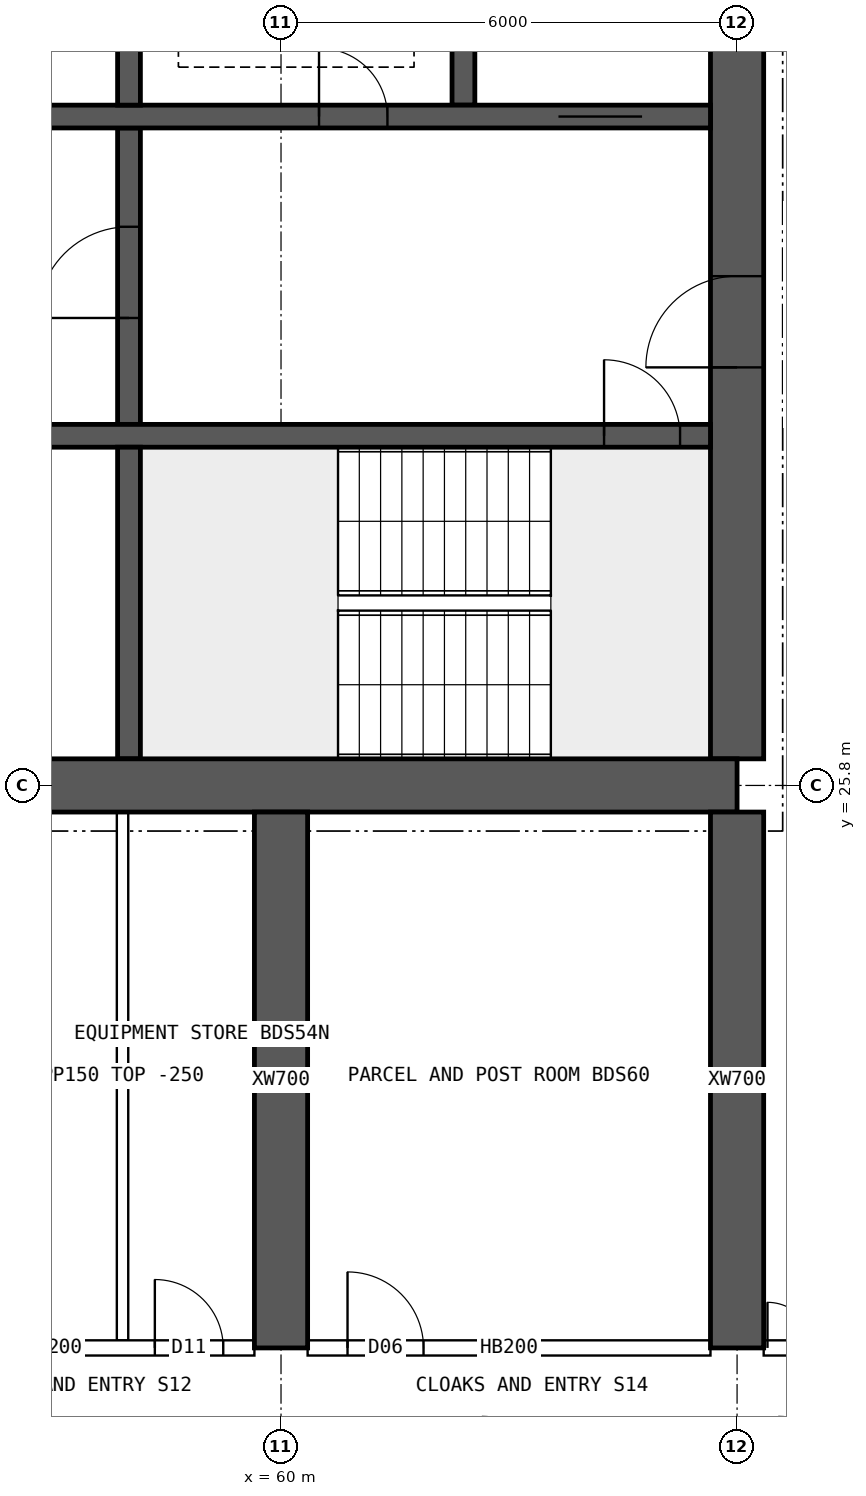
"""IFC4 building model, lengths in metres.
Left out: names, types, materials, properties, quantities, classifications, styles, units other than length and angle.
Written with IfcOpenShell. Run it as: python <this file> out.ifc"""

import sys

from ifc_helpers import new_model, si_unit, direction, frame, frame_2d, origin, place, context, subcontext, project, spatial, rectangle, extrude, element, fill, save


model = new_model("IFC4")
c1 = context("Model", 3, precision=1e-05, world=origin(), true_north=direction((0.0, 1.0)))
c2 = subcontext(c1, "Body", "Model", "MODEL_VIEW")
j1 = project(units=[si_unit("LENGTHUNIT", "METRE"), si_unit("PLANEANGLEUNIT", "RADIAN")], contexts=[c1])
p1 = place(None, origin())
s1 = spatial("IfcSite", under=j1, at=p1, CompositionType="ELEMENT")
p2 = place(p1, origin())
s2 = spatial("IfcBuilding", under=s1, at=p2, CompositionType="ELEMENT")
p3 = place(p2, frame((0.0, 0.0, 250.3)))
s3 = spatial("IfcBuildingStorey", under=s2, at=p3, CompositionType="ELEMENT", Elevation=250.3)
p4 = place(p3, frame((18.0, 25.8, 0.0), z_axis=(0.0, 0.0, 1.0), x_axis=(1.0, 0.0, 0.0)))
e1 = element("IfcWall", 1, at=p4, inside=s3, PredefinedType="SHEAR", context=c2, shape_type="SweptSolid", body=[
    extrude(rectangle(XDim=48.0, YDim=0.7, at=frame_2d((24.0, 0.0))), origin(), (0.0, 0.0, 1.0), 3.75),
])
p5 = place(p3, frame((66.0, 26.15, 0.0), z_axis=(0.0, 0.0, 1.0), x_axis=(0.0, 1.0, 0.0)))
e2 = element("IfcWall", 2, at=p5, inside=s3, PredefinedType="SHEAR", context=c2, shape_type="SweptSolid", body=[
    extrude(rectangle(XDim=11.7, YDim=0.7, at=frame_2d((5.85, 0.0))), origin(), (0.0, 0.0, 1.0), 3.75),
])
p6 = place(p5, frame((5.15, 0.0, 0.0)))
e3 = element("IfcOpeningElement", 3, at=p6, cuts=e2, PredefinedType="OPENING", context=c2, shape_type="SweptSolid", body=[
    extrude(rectangle(XDim=1.2, YDim=2.1, at=frame_2d((0.6, 1.05))), frame((0.0, 0.36, 0.0), z_axis=(0.0, -1.0, 0.0), x_axis=(1.0, 0.0, 0.0)), (0.0, 0.0, 1.0), 0.72),
])
p7 = place(p3, frame((18.35, 30.4, 0.0), z_axis=(0.0, 0.0, 1.0), x_axis=(1.0, 0.0, 0.0)))
e4 = element("IfcWall", 4, at=p7, inside=s3, PredefinedType="SHEAR", context=c2, shape_type="SweptSolid", body=[
    extrude(rectangle(XDim=47.3, YDim=0.3, at=frame_2d((23.65, 0.0))), origin(), (0.0, 0.0, 1.0), 3.75),
])
p8 = place(p7, frame((0.4, 0.0, 0.0)))
e5 = element("IfcOpeningElement", 5, at=p8, cuts=e4, PredefinedType="OPENING", context=c2, shape_type="SweptSolid", body=[
    extrude(rectangle(XDim=1.0, YDim=2.1, at=frame_2d((0.5, 1.05))), frame((0.0, 0.16, 0.0), z_axis=(0.0, -1.0, 0.0), x_axis=(1.0, 0.0, 0.0)), (0.0, 0.0, 1.0), 0.32),
])
p9 = place(p7, frame((45.9, 0.0, 0.0)))
e6 = element("IfcOpeningElement", 6, at=p9, cuts=e4, PredefinedType="OPENING", context=c2, shape_type="SweptSolid", body=[
    extrude(rectangle(XDim=1.0, YDim=2.1, at=frame_2d((0.5, 1.05))), frame((0.0, 0.16, 0.0), z_axis=(0.0, -1.0, 0.0), x_axis=(1.0, 0.0, 0.0)), (0.0, 0.0, 1.0), 0.32),
])
p10 = place(p7, frame((8.4, 0.0, 0.0)))
e7 = element("IfcOpeningElement", 7, at=p10, cuts=e4, PredefinedType="OPENING", context=c2, shape_type="SweptSolid", body=[
    extrude(rectangle(XDim=1.1, YDim=2.1, at=frame_2d((0.55, 1.05))), frame((0.0, 0.16, 0.0), z_axis=(0.0, -1.0, 0.0), x_axis=(1.0, 0.0, 0.0)), (0.0, 0.0, 1.0), 0.32),
])
p11 = place(p7, frame((11.0, 0.0, 0.0)))
e8 = element("IfcOpeningElement", 8, at=p11, cuts=e4, PredefinedType="OPENING", context=c2, shape_type="SweptSolid", body=[
    extrude(rectangle(XDim=1.1, YDim=2.1, at=frame_2d((0.55, 1.05))), frame((0.0, 0.16, 0.0), z_axis=(0.0, -1.0, 0.0), x_axis=(1.0, 0.0, 0.0)), (0.0, 0.0, 1.0), 0.32),
])
p12 = place(p7, frame((13.6, 0.0, 0.0)))
e9 = element("IfcOpeningElement", 9, at=p12, cuts=e4, PredefinedType="OPENING", context=c2, shape_type="SweptSolid", body=[
    extrude(rectangle(XDim=1.1, YDim=2.1, at=frame_2d((0.55, 1.05))), frame((0.0, 0.16, 0.0), z_axis=(0.0, -1.0, 0.0), x_axis=(1.0, 0.0, 0.0)), (0.0, 0.0, 1.0), 0.32),
])
p13 = place(p7, frame((16.2, 0.0, 0.0)))
e10 = element("IfcOpeningElement", 10, at=p13, cuts=e4, PredefinedType="OPENING", context=c2, shape_type="SweptSolid", body=[
    extrude(rectangle(XDim=1.1, YDim=2.1, at=frame_2d((0.55, 1.05))), frame((0.0, 0.16, 0.0), z_axis=(0.0, -1.0, 0.0), x_axis=(1.0, 0.0, 0.0)), (0.0, 0.0, 1.0), 0.32),
])
p14 = place(p7, frame((18.975, 0.0, 0.0)))
e11 = element("IfcOpeningElement", 11, at=p14, cuts=e4, PredefinedType="OPENING", context=c2, shape_type="SweptSolid", body=[
    extrude(rectangle(XDim=0.9, YDim=2.1, at=frame_2d((0.45, 1.05))), frame((0.0, 0.16, 0.0), z_axis=(0.0, -1.0, 0.0), x_axis=(1.0, 0.0, 0.0)), (0.0, 0.0, 1.0), 0.32),
])
p15 = place(p7, frame((24.475, 0.0, 0.0)))
e12 = element("IfcOpeningElement", 12, at=p15, cuts=e4, PredefinedType="OPENING", context=c2, shape_type="SweptSolid", body=[
    extrude(rectangle(XDim=0.9, YDim=2.1, at=frame_2d((0.45, 1.05))), frame((0.0, 0.16, 0.0), z_axis=(0.0, -1.0, 0.0), x_axis=(1.0, 0.0, 0.0)), (0.0, 0.0, 1.0), 0.32),
])
p16 = place(p7, frame((30.267, 0.0, 0.0)))
e13 = element("IfcOpeningElement", 13, at=p16, cuts=e4, PredefinedType="OPENING", context=c2, shape_type="SweptSolid", body=[
    extrude(rectangle(XDim=1.1, YDim=2.1, at=frame_2d((0.55, 1.05))), frame((0.0, 0.16, 0.0), z_axis=(0.0, -1.0, 0.0), x_axis=(1.0, 0.0, 0.0)), (0.0, 0.0, 1.0), 0.32),
])
p17 = place(p7, frame((33.8, 0.0, 0.0)))
e14 = element("IfcOpeningElement", 14, at=p17, cuts=e4, PredefinedType="OPENING", context=c2, shape_type="SweptSolid", body=[
    extrude(rectangle(XDim=1.1, YDim=2.1, at=frame_2d((0.55, 1.05))), frame((0.0, 0.16, 0.0), z_axis=(0.0, -1.0, 0.0), x_axis=(1.0, 0.0, 0.0)), (0.0, 0.0, 1.0), 0.32),
])
p18 = place(p7, frame((37.333, 0.0, 0.0)))
e15 = element("IfcOpeningElement", 15, at=p18, cuts=e4, PredefinedType="OPENING", context=c2, shape_type="SweptSolid", body=[
    extrude(rectangle(XDim=1.1, YDim=2.1, at=frame_2d((0.55, 1.05))), frame((0.0, 0.16, 0.0), z_axis=(0.0, -1.0, 0.0), x_axis=(1.0, 0.0, 0.0)), (0.0, 0.0, 1.0), 0.32),
])
p19 = place(p3, frame((18.35, 34.6, 0.0), z_axis=(0.0, 0.0, 1.0), x_axis=(1.0, 0.0, 0.0)))
e16 = element("IfcWall", 16, at=p19, inside=s3, PredefinedType="SHEAR", context=c2, shape_type="SweptSolid", body=[
    extrude(rectangle(XDim=47.3, YDim=0.3, at=frame_2d((23.65, 0.0))), origin(), (0.0, 0.0, 1.0), 3.75),
])
p20 = place(p19, frame((0.9, 0.0, 0.0)))
e17 = element("IfcOpeningElement", 17, at=p20, cuts=e16, PredefinedType="OPENING", context=c2, shape_type="SweptSolid", body=[
    extrude(rectangle(XDim=1.1, YDim=2.1, at=frame_2d((0.55, 1.05))), frame((0.0, 0.16, 0.0), z_axis=(0.0, -1.0, 0.0), x_axis=(1.0, 0.0, 0.0)), (0.0, 0.0, 1.0), 0.32),
])
p21 = place(p19, frame((45.3, 0.0, 0.0)))
e18 = element("IfcOpeningElement", 18, at=p21, cuts=e16, PredefinedType="OPENING", context=c2, shape_type="SweptSolid", body=[
    extrude(rectangle(XDim=1.1, YDim=2.1, at=frame_2d((0.55, 1.05))), frame((0.0, 0.16, 0.0), z_axis=(0.0, -1.0, 0.0), x_axis=(1.0, 0.0, 0.0)), (0.0, 0.0, 1.0), 0.32),
])
p22 = place(p19, frame((4.25, 0.0, 0.0)))
e19 = element("IfcOpeningElement", 19, at=p22, cuts=e16, PredefinedType="OPENING", context=c2, shape_type="SweptSolid", body=[
    extrude(rectangle(XDim=0.9, YDim=2.1, at=frame_2d((0.45, 1.05))), frame((0.0, 0.16, 0.0), z_axis=(0.0, -1.0, 0.0), x_axis=(1.0, 0.0, 0.0)), (0.0, 0.0, 1.0), 0.32),
])
p23 = place(p19, frame((42.15, 0.0, 0.0)))
e20 = element("IfcOpeningElement", 20, at=p23, cuts=e16, PredefinedType="OPENING", context=c2, shape_type="SweptSolid", body=[
    extrude(rectangle(XDim=0.9, YDim=2.1, at=frame_2d((0.45, 1.05))), frame((0.0, 0.16, 0.0), z_axis=(0.0, -1.0, 0.0), x_axis=(1.0, 0.0, 0.0)), (0.0, 0.0, 1.0), 0.32),
])
p24 = place(p19, frame((9.025, 0.0, 0.0)))
e21 = element("IfcOpeningElement", 21, at=p24, cuts=e16, PredefinedType="OPENING", context=c2, shape_type="SweptSolid", body=[
    extrude(rectangle(XDim=0.9, YDim=2.1, at=frame_2d((0.45, 1.05))), frame((0.0, 0.16, 0.0), z_axis=(0.0, -1.0, 0.0), x_axis=(1.0, 0.0, 0.0)), (0.0, 0.0, 1.0), 0.32),
])
p25 = place(p19, frame((12.999, 0.0, 0.0)))
e22 = element("IfcOpeningElement", 22, at=p25, cuts=e16, PredefinedType="OPENING", context=c2, shape_type="SweptSolid", body=[
    extrude(rectangle(XDim=0.9, YDim=2.1, at=frame_2d((0.45, 1.05))), frame((0.0, 0.16, 0.0), z_axis=(0.0, -1.0, 0.0), x_axis=(1.0, 0.0, 0.0)), (0.0, 0.0, 1.0), 0.32),
])
p26 = place(p19, frame((16.646, 0.0, 0.0)))
e23 = element("IfcOpeningElement", 23, at=p26, cuts=e16, PredefinedType="OPENING", context=c2, shape_type="SweptSolid", body=[
    extrude(rectangle(XDim=0.9, YDim=2.1, at=frame_2d((0.45, 1.05))), frame((0.0, 0.16, 0.0), z_axis=(0.0, -1.0, 0.0), x_axis=(1.0, 0.0, 0.0)), (0.0, 0.0, 1.0), 0.32),
])
p27 = place(p19, frame((20.405, 0.0, 0.0)))
e24 = element("IfcOpeningElement", 24, at=p27, cuts=e16, PredefinedType="OPENING", context=c2, shape_type="SweptSolid", body=[
    extrude(rectangle(XDim=0.9, YDim=2.1, at=frame_2d((0.45, 1.05))), frame((0.0, 0.16, 0.0), z_axis=(0.0, -1.0, 0.0), x_axis=(1.0, 0.0, 0.0)), (0.0, 0.0, 1.0), 0.32),
])
p28 = place(p19, frame((24.811, 0.0, 0.0)))
e25 = element("IfcOpeningElement", 25, at=p28, cuts=e16, PredefinedType="OPENING", context=c2, shape_type="SweptSolid", body=[
    extrude(rectangle(XDim=0.9, YDim=2.1, at=frame_2d((0.45, 1.05))), frame((0.0, 0.16, 0.0), z_axis=(0.0, -1.0, 0.0), x_axis=(1.0, 0.0, 0.0)), (0.0, 0.0, 1.0), 0.32),
])
p29 = place(p19, frame((27.608, 0.0, 0.0)))
e26 = element("IfcOpeningElement", 26, at=p29, cuts=e16, PredefinedType="OPENING", context=c2, shape_type="SweptSolid", body=[
    extrude(rectangle(XDim=0.9, YDim=2.1, at=frame_2d((0.45, 1.05))), frame((0.0, 0.16, 0.0), z_axis=(0.0, -1.0, 0.0), x_axis=(1.0, 0.0, 0.0)), (0.0, 0.0, 1.0), 0.32),
])
p30 = place(p19, frame((29.981, 0.0, 0.0)))
e27 = element("IfcOpeningElement", 27, at=p30, cuts=e16, PredefinedType="OPENING", context=c2, shape_type="SweptSolid", body=[
    extrude(rectangle(XDim=0.9, YDim=2.1, at=frame_2d((0.45, 1.05))), frame((0.0, 0.16, 0.0), z_axis=(0.0, -1.0, 0.0), x_axis=(1.0, 0.0, 0.0)), (0.0, 0.0, 1.0), 0.32),
])
p31 = place(p19, frame((35.451, 0.0, 0.0)))
e28 = element("IfcOpeningElement", 28, at=p31, cuts=e16, PredefinedType="OPENING", context=c2, shape_type="SweptSolid", body=[
    extrude(rectangle(XDim=0.9, YDim=2.1, at=frame_2d((0.45, 1.05))), frame((0.0, 0.16, 0.0), z_axis=(0.0, -1.0, 0.0), x_axis=(1.0, 0.0, 0.0)), (0.0, 0.0, 1.0), 0.32),
])
p32 = place(p3, frame((58.0, 26.15, 0.0), z_axis=(0.0, 0.0, 1.0), x_axis=(0.0, 1.0, 0.0)))
e29 = element("IfcWall", 29, at=p32, inside=s3, PredefinedType="SHEAR", context=c2, shape_type="SweptSolid", body=[
    extrude(rectangle(XDim=4.1, YDim=0.3, at=frame_2d((2.05, 0.0))), origin(), (0.0, 0.0, 1.0), 3.75),
])
p33 = place(p3, frame((58.0, 30.55, 0.0), z_axis=(0.0, 0.0, 1.0), x_axis=(0.0, 1.0, 0.0)))
e30 = element("IfcWall", 30, at=p33, inside=s3, PredefinedType="SHEAR", context=c2, shape_type="SweptSolid", body=[
    extrude(rectangle(XDim=3.9, YDim=0.3, at=frame_2d((1.95, 0.0))), origin(), (0.0, 0.0, 1.0), 3.75),
])
p34 = place(p33, frame((1.4, 0.0, 0.0)))
e31 = element("IfcOpeningElement", 31, at=p34, cuts=e30, PredefinedType="OPENING", context=c2, shape_type="SweptSolid", body=[
    extrude(rectangle(XDim=1.2, YDim=2.1, at=frame_2d((0.6, 1.05))), frame((0.0, 0.16, 0.0), z_axis=(0.0, -1.0, 0.0), x_axis=(1.0, 0.0, 0.0)), (0.0, 0.0, 1.0), 0.32),
])
for number, where, z_axis, x_axis in (
    (32, (62.4, 34.75, 0.0), (0.0, 0.0, 1.0), (0.0, 1.0, 0.0)),
    (33, (58.0, 34.75, 0.0), (0.0, 0.0, 1.0), (0.0, 1.0, 0.0)),
):
    element("IfcWall", number, at=place(p3, frame(where, z_axis=z_axis, x_axis=x_axis)), inside=s3, PredefinedType="SHEAR", context=c2, shape_type="SweptSolid", body=[
        extrude(rectangle(XDim=3.1, YDim=0.3, at=frame_2d((1.55, 0.0))), origin(), (0.0, 0.0, 1.0), 3.75),
    ])
for number, where, z_axis, x_axis in (
    (34, (60.0, 18.4, 0.0), (0.0, 0.0, 1.0), (0.0, 1.0, 0.0)),
    (35, (66.0, 18.4, 0.0), (0.0, 0.0, 1.0), (0.0, 1.0, 0.0)),
):
    element("IfcWall", number, at=place(p3, frame(where, z_axis=z_axis, x_axis=x_axis)), inside=s3, PredefinedType="SHEAR", context=c2, shape_type="SweptSolid", body=[
        extrude(rectangle(XDim=7.05, YDim=0.7, at=frame_2d((3.525, 0.0))), origin(), (0.0, 0.0, 1.0), 3.75),
    ])
p35 = place(p3, frame((54.35, 18.4, 0.0), z_axis=(0.0, 0.0, 1.0), x_axis=(1.0, 0.0, 0.0)))
e36 = element("IfcWall", 36, at=p35, inside=s3, PredefinedType="SOLIDWALL", context=c2, shape_type="SweptSolid", body=[
    extrude(rectangle(XDim=5.3, YDim=0.2, at=frame_2d((2.65, 0.0))), origin(), (0.0, 0.0, 1.0), 3.5),
])
p36 = place(p35, frame((0.35, 0.0, 0.0)))
e37 = element("IfcOpeningElement", 37, at=p36, cuts=e36, PredefinedType="OPENING", context=c2, shape_type="SweptSolid", body=[
    extrude(rectangle(XDim=0.9, YDim=2.1, at=frame_2d((0.45, 1.05))), frame((0.0, 0.11, 0.0), z_axis=(0.0, -1.0, 0.0), x_axis=(1.0, 0.0, 0.0)), (0.0, 0.0, 1.0), 0.22),
])
p37 = place(p35, frame((3.99, 0.0, 0.0)))
e38 = element("IfcOpeningElement", 38, at=p37, cuts=e36, PredefinedType="OPENING", context=c2, shape_type="SweptSolid", body=[
    extrude(rectangle(XDim=0.9, YDim=2.1, at=frame_2d((0.45, 1.05))), frame((0.0, 0.11, 0.0), z_axis=(0.0, -1.0, 0.0), x_axis=(1.0, 0.0, 0.0)), (0.0, 0.0, 1.0), 0.22),
])
p38 = place(p3, frame((60.35, 18.4, 0.0), z_axis=(0.0, 0.0, 1.0), x_axis=(1.0, 0.0, 0.0)))
e39 = element("IfcWall", 39, at=p38, inside=s3, PredefinedType="SOLIDWALL", context=c2, shape_type="SweptSolid", body=[
    extrude(rectangle(XDim=5.3, YDim=0.2, at=frame_2d((2.65, 0.0))), origin(), (0.0, 0.0, 1.0), 3.5),
])
p39 = place(p38, frame((0.525, 0.0, 0.0)))
e40 = element("IfcOpeningElement", 40, at=p39, cuts=e39, PredefinedType="OPENING", context=c2, shape_type="SweptSolid", body=[
    extrude(rectangle(XDim=1.0, YDim=2.1, at=frame_2d((0.5, 1.05))), frame((0.0, 0.11, 0.0), z_axis=(0.0, -1.0, 0.0), x_axis=(1.0, 0.0, 0.0)), (0.0, 0.0, 1.0), 0.22),
])
p40 = place(p3, frame((66.35, 18.4, 0.0), z_axis=(0.0, 0.0, 1.0), x_axis=(1.0, 0.0, 0.0)))
e41 = element("IfcWall", 41, at=p40, inside=s3, PredefinedType="SOLIDWALL", context=c2, shape_type="SweptSolid", body=[
    extrude(rectangle(XDim=2.05, YDim=0.2, at=frame_2d((1.025, 0.0))), origin(), (0.0, 0.0, 1.0), 3.5),
])
p41 = place(p40, frame((0.05, 0.0, 0.0)))
e42 = element("IfcOpeningElement", 42, at=p41, cuts=e41, PredefinedType="OPENING", context=c2, shape_type="SweptSolid", body=[
    extrude(rectangle(XDim=1.2, YDim=2.1, at=frame_2d((0.6, 1.05))), frame((0.0, 0.11, 0.0), z_axis=(0.0, -1.0, 0.0), x_axis=(1.0, 0.0, 0.0)), (0.0, 0.0, 1.0), 0.22),
])
p42 = place(p3, frame((57.915, 18.5, 0.0), z_axis=(0.0, 0.0, 1.0), x_axis=(0.0, 1.0, 0.0)))
e43 = element("IfcWall", 43, at=p42, inside=s3, PredefinedType="PARTITIONING", context=c2, shape_type="SweptSolid", body=[
    extrude(rectangle(XDim=6.95, YDim=0.15, at=frame_2d((3.475, 0.0))), origin(), (0.0, 0.0, 1.0), 3.5),
])
p43 = place(p6, origin())
e44 = element("IfcDoor", 44, at=p43, inside=s3, OperationType="SINGLE_SWING_LEFT", PredefinedType="DOOR", context=c2, shape_type="SweptSolid", body=[
    extrude(rectangle(XDim=1.2, YDim=2.1, at=frame_2d((0.6, 1.05))), frame((0.0, 0.025, 0.0), z_axis=(0.0, -1.0, 0.0), x_axis=(1.0, 0.0, 0.0)), (0.0, 0.0, 1.0), 0.05),
])
fill(e3, e44)
p44 = place(p9, origin())
e45 = element("IfcDoor", 45, at=p44, inside=s3, OperationType="SINGLE_SWING_LEFT", PredefinedType="DOOR", context=c2, shape_type="SweptSolid", body=[
    extrude(rectangle(XDim=1.0, YDim=2.1, at=frame_2d((0.5, 1.05))), frame((0.0, 0.025, 0.0), z_axis=(0.0, -1.0, 0.0), x_axis=(1.0, 0.0, 0.0)), (0.0, 0.0, 1.0), 0.05),
])
fill(e6, e45)
p45 = place(p21, origin())
e46 = element("IfcDoor", 46, at=p45, inside=s3, OperationType="DOUBLE_DOOR_SLIDING", PredefinedType="DOOR", context=c2, shape_type="SweptSolid", body=[
    extrude(rectangle(XDim=1.1, YDim=2.1, at=frame_2d((0.55, 1.05))), frame((0.0, 0.025, 0.0), z_axis=(0.0, -1.0, 0.0), x_axis=(1.0, 0.0, 0.0)), (0.0, 0.0, 1.0), 0.05),
])
fill(e18, e46)
p46 = place(p23, origin())
e47 = element("IfcDoor", 47, at=p46, inside=s3, OperationType="SINGLE_SWING_LEFT", PredefinedType="DOOR", context=c2, shape_type="SweptSolid", body=[
    extrude(rectangle(XDim=0.9, YDim=2.1, at=frame_2d((0.45, 1.05))), frame((0.0, 0.025, 0.0), z_axis=(0.0, -1.0, 0.0), x_axis=(1.0, 0.0, 0.0)), (0.0, 0.0, 1.0), 0.05),
])
fill(e20, e47)
p47 = place(p34, origin())
e48 = element("IfcDoor", 48, at=p47, inside=s3, OperationType="SINGLE_SWING_LEFT", PredefinedType="DOOR", context=c2, shape_type="SweptSolid", body=[
    extrude(rectangle(XDim=1.2, YDim=2.1, at=frame_2d((0.6, 1.05))), frame((0.0, 0.025, 0.0), z_axis=(0.0, -1.0, 0.0), x_axis=(1.0, 0.0, 0.0)), (0.0, 0.0, 1.0), 0.05),
])
fill(e31, e48)
p48 = place(p41, origin())
e49 = element("IfcDoor", 49, at=p48, inside=s3, OperationType="DOUBLE_DOOR_SINGLE_SWING", PredefinedType="DOOR", context=c2, shape_type="SweptSolid", body=[
    extrude(rectangle(XDim=1.2, YDim=2.1, at=frame_2d((0.6, 1.05))), frame((0.0, 0.025, 0.0), z_axis=(0.0, -1.0, 0.0), x_axis=(1.0, 0.0, 0.0)), (0.0, 0.0, 1.0), 0.05),
])
fill(e42, e49)
p49 = place(p37, origin())
e50 = element("IfcDoor", 50, at=p49, inside=s3, OperationType="SINGLE_SWING_LEFT", PredefinedType="DOOR", context=c2, shape_type="SweptSolid", body=[
    extrude(rectangle(XDim=0.9, YDim=2.1, at=frame_2d((0.45, 1.05))), frame((0.0, 0.025, 0.0), z_axis=(0.0, -1.0, 0.0), x_axis=(1.0, 0.0, 0.0)), (0.0, 0.0, 1.0), 0.05),
])
fill(e38, e50)
p50 = place(p39, origin())
e51 = element("IfcDoor", 51, at=p50, inside=s3, OperationType="SINGLE_SWING_LEFT", PredefinedType="DOOR", context=c2, shape_type="SweptSolid", body=[
    extrude(rectangle(XDim=1.0, YDim=2.1, at=frame_2d((0.5, 1.05))), frame((0.0, 0.025, 0.0), z_axis=(0.0, -1.0, 0.0), x_axis=(1.0, 0.0, 0.0)), (0.0, 0.0, 1.0), 0.05),
])
fill(e40, e51)
save(model, sys.argv[1])
